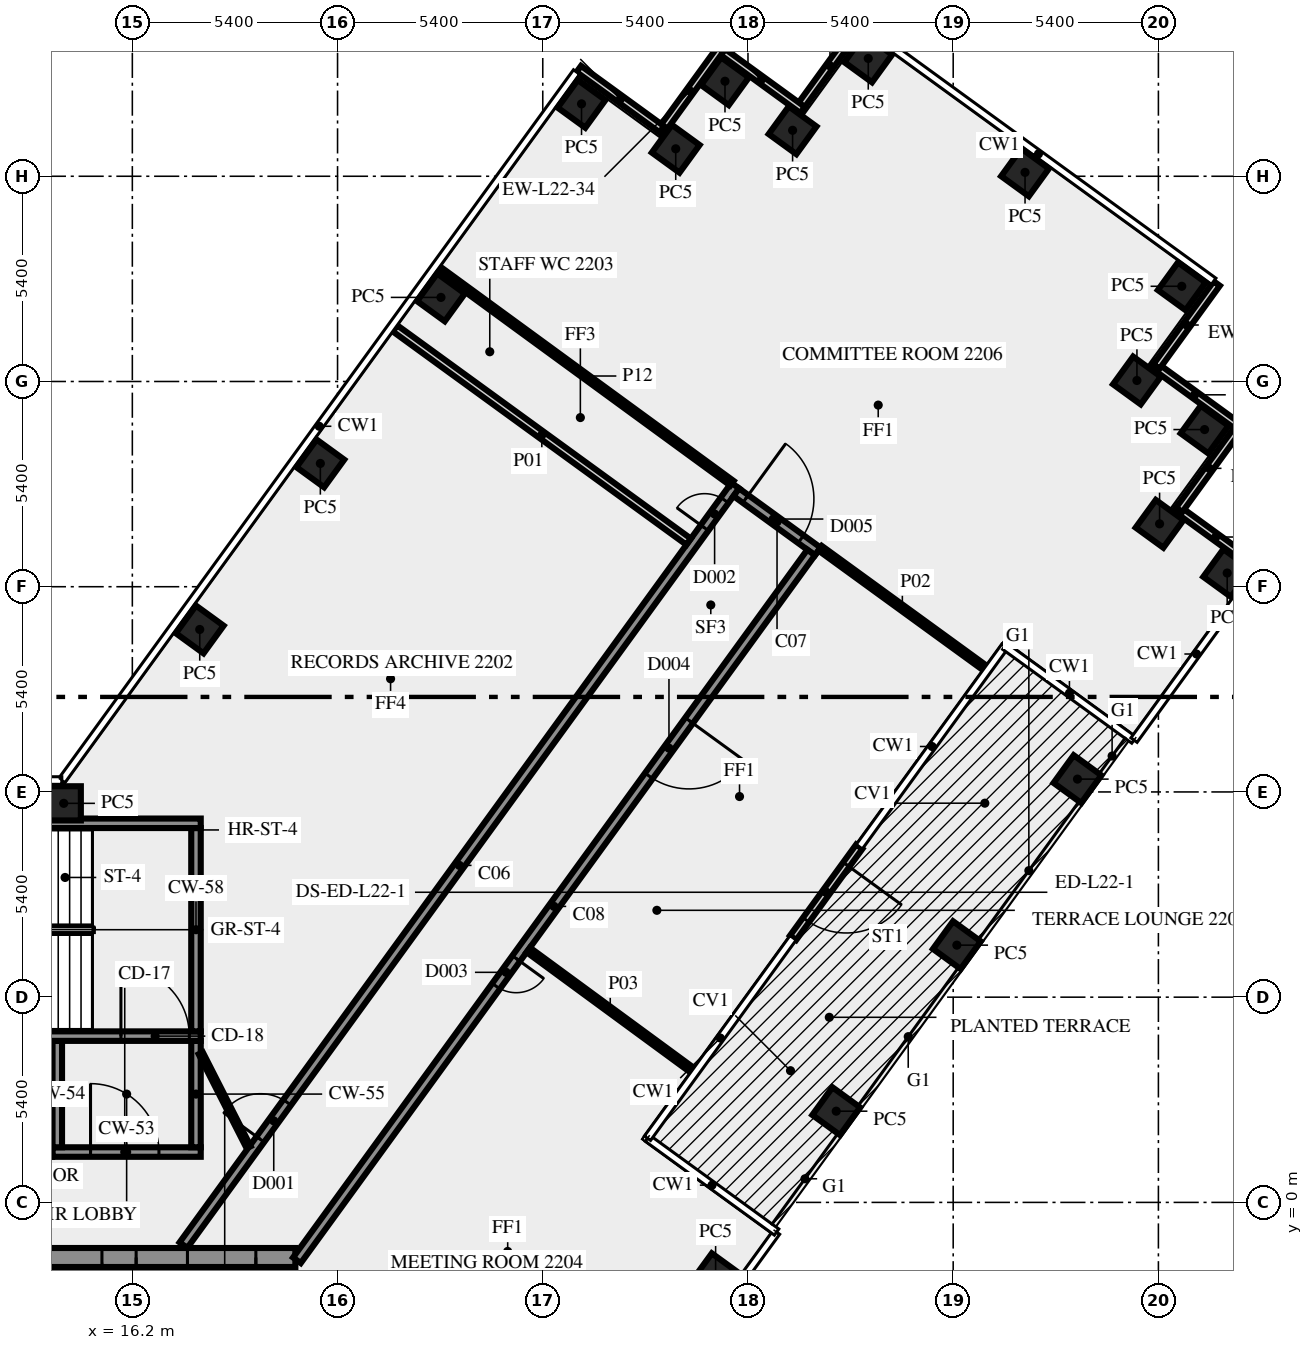
"""IFC4 building model, lengths in metres.
Left out: names, types, materials, properties, quantities, classifications, styles, units other than length and angle.
Written with IfcOpenShell. Run it as: python <this file> out.ifc"""

import sys

from ifc_helpers import new_model, si_unit, direction, frame, frame_2d, origin, origin_2d, place, context, subcontext, project, spatial, rectangle, extrude, element, fill, save


model = new_model("IFC4")
c1 = context("Model", 3, precision=1e-05, world=origin(), true_north=direction((0.0, 1.0)))
c2 = subcontext(c1, "Body", "Model", "MODEL_VIEW")
j1 = project(units=[si_unit("LENGTHUNIT", "METRE"), si_unit("PLANEANGLEUNIT", "RADIAN")], contexts=[c1])
p1 = place(None, origin())
s1 = spatial("IfcSite", under=j1, at=p1, CompositionType="ELEMENT")
p2 = place(p1, origin())
s2 = spatial("IfcBuilding", under=s1, at=p2, CompositionType="ELEMENT")
p3 = place(p2, frame((0.0, 0.0, 97.0)))
s3 = spatial("IfcBuildingStorey", under=s2, at=p3, CompositionType="ELEMENT", Elevation=97.0)
for number, where, z_axis, x_axis in (
    (1, (31.548, -1.969, 0.0), (0.0, 0.0, 1.0), (0.588, 0.809, 0.0)),
    (2, (34.722, 2.4, 0.0), (0.0, 0.0, 1.0), (0.588, 0.809, 0.0)),
    (3, (37.896, 6.769, 0.0), (0.0, 0.0, 1.0), (0.588, 0.809, 0.0)),
    (4, (41.07, 11.137, 0.0), (0.0, 0.0, 1.0), (0.588, 0.809, 0.0)),
    (5, (45.01, 16.56, 0.0), (0.0, 0.0, 1.0), (0.588, 0.809, 0.0)),
    (6, (43.231, 17.854, 0.0), (0.0, 0.0, 1.0), (0.588, 0.809, 0.0)),
    (7, (44.415, 20.335, 0.0), (0.0, 0.0, 1.0), (0.588, 0.809, 0.0)),
    (8, (42.635, 21.626, 0.0), (0.0, 0.0, 1.0), (-0.809, 0.588, 0.0)),
    (9, (43.815, 24.105, 0.0), (0.0, 0.0, 1.0), (-0.809, 0.588, 0.0)),
    (10, (39.691, 27.102, 0.0), (0.0, 0.0, 1.0), (-0.809, 0.588, 0.0)),
    (11, (35.565, 30.1, 0.0), (0.0, 0.0, 1.0), (-0.588, -0.809, 0.0)),
    (12, (33.574, 28.209, 0.0), (0.0, 0.0, 1.0), (-0.809, 0.588, 0.0)),
    (13, (31.795, 29.5, 0.0), (0.0, 0.0, 1.0), (-0.588, -0.809, 0.0)),
    (14, (30.499, 27.723, 0.0), (0.0, 0.0, 1.0), (-0.809, 0.588, 0.0)),
    (15, (28.02, 28.905, 0.0), (0.0, 0.0, 1.0), (-0.809, 0.588, 0.0)),
    (16, (24.321, 23.812, 0.0), (0.0, 0.0, 1.0), (-0.588, -0.809, 0.0)),
    (17, (21.147, 19.444, 0.0), (0.0, 0.0, 1.0), (-0.588, -0.809, 0.0)),
    (18, (17.974, 15.075, 0.0), (0.0, 0.0, 1.0), (-0.588, -0.809, 0.0)),
    (19, (14.395, 10.5, 0.0), (0.0, 0.0, 1.0), (-1.0, 0.0, 0.0)),
):
    element("IfcColumn", number, at=place(p3, frame(where, z_axis=z_axis, x_axis=x_axis)), inside=s3, PredefinedType="COLUMN", context=c2, shape_type="SweptSolid", body=[
        extrude(rectangle(XDim=0.9, YDim=0.9, at=origin_2d()), origin(), (0.0, 0.0, 1.0), 3.65),
    ])
p4 = place(p3, frame((35.328, 9.359, 0.0), z_axis=(0.0, 0.0, 1.0), x_axis=(-0.587774760134, -0.809024617271, 0.0)))
e20 = element("IfcWall", 20, at=p4, inside=s3, PredefinedType="SOLIDWALL", context=c2, shape_type="SweptSolid", body=[
    extrude(rectangle(XDim=2.963, YDim=0.2, at=frame_2d((1.481, 0.0))), origin(), (0.0, 0.0, 1.0), 3.65),
])
p5 = place(p4, frame((0.582, 0.0, 0.0)))
e21 = element("IfcOpeningElement", 21, at=p5, cuts=e20, PredefinedType="OPENING", context=c2, shape_type="SweptSolid", body=[
    extrude(rectangle(XDim=1.8, YDim=2.4, at=frame_2d((0.9, 1.2))), frame((0.0, 0.11, 0.0), z_axis=(0.0, -1.0, 0.0), x_axis=(1.0, 0.0, 0.0)), (0.0, 0.0, 1.0), 0.22),
])
p6 = place(p3, frame((45.761, 16.743, 0.0), z_axis=(0.0, 0.0, 1.0), x_axis=(-0.808979656733, 0.587836639716, 0.0)))
e22 = element("IfcWall", 22, at=p6, inside=s3, PredefinedType="SOLIDWALL", context=c2, shape_type="SweptSolid", body=[
    extrude(rectangle(XDim=2.6, YDim=0.2, at=frame_2d((1.3, 0.0))), origin(), (0.0, 0.0, 1.0), 3.65),
])
for number, where, z_axis, x_axis in (
    (23, (43.746, 18.223, 0.0), (0.0, 0.0, 1.0), (0.588, 0.809, 0.0)),
    (24, (45.245, 20.456, 0.0), (0.0, 0.0, 1.0), (-0.809, 0.588, 0.0)),
    (25, (43.149, 21.994, 0.0), (0.0, 0.0, 1.0), (0.588, 0.809, 0.0)),
    (26, (35.351, 30.997, 0.0), (0.0, 0.0, 1.0), (-0.588, -0.809, 0.0)),
    (27, (33.838, 28.744, 0.0), (0.0, 0.0, 1.0), (-0.809, 0.588, 0.0)),
    (28, (31.67, 30.333, 0.0), (0.0, 0.0, 1.0), (-0.588, -0.809, 0.0)),
    (29, (30.133, 28.237, 0.0), (0.0, 0.0, 1.0), (-0.809, 0.588, 0.0)),
):
    element("IfcWall", number, at=place(p3, frame(where, z_axis=z_axis, x_axis=x_axis)), inside=s3, PredefinedType="SOLIDWALL", context=c2, shape_type="SweptSolid", body=[
        extrude(rectangle(XDim=2.7, YDim=0.2, at=frame_2d((1.35, 0.0))), origin(), (0.0, 0.0, 1.0), 3.65),
    ])
p7 = place(p3, frame((19.75, -10.5, 0.0), z_axis=(0.0, 0.0, 1.0), x_axis=(0.0, 1.0, 0.0)))
e30 = element("IfcWall", 30, at=p7, inside=s3, PredefinedType="SHEAR", context=c2, shape_type="SweptSolid", body=[
    extrude(rectangle(XDim=8.8, YDim=0.5, at=frame_2d((4.4, 0.0))), origin(), (0.0, 0.0, 1.0), 3.65),
])
p8 = place(p3, frame((17.475, -6.0, 0.0), z_axis=(0.0, 0.0, 1.0), x_axis=(0.0, 1.0, 0.0)))
e31 = element("IfcWall", 31, at=p8, inside=s3, PredefinedType="SHEAR", context=c2, shape_type="SweptSolid", body=[
    extrude(rectangle(XDim=4.3, YDim=0.25, at=frame_2d((2.15, 0.0))), origin(), (0.0, 0.0, 1.0), 3.65),
])
p9 = place(p8, frame((0.55, 0.0, 0.0)))
e32 = element("IfcOpeningElement", 32, at=p9, cuts=e31, PredefinedType="OPENING", context=c2, shape_type="SweptSolid", body=[
    extrude(rectangle(XDim=1.3, YDim=2.1, at=frame_2d((0.65, 1.05))), frame((0.0, 0.135, 0.0), z_axis=(0.0, -1.0, 0.0), x_axis=(1.0, 0.0, 0.0)), (0.0, 0.0, 1.0), 0.27),
])
p10 = place(p3, frame((14.225, -3.35, 0.0), z_axis=(0.0, 0.0, 1.0), x_axis=(0.0, 1.0, 0.0)))
e33 = element("IfcWall", 33, at=p10, inside=s3, PredefinedType="SHEAR", context=c2, shape_type="SweptSolid", body=[
    extrude(rectangle(XDim=1.65, YDim=0.25, at=frame_2d((0.825, 0.0))), origin(), (0.0, 0.0, 1.0), 3.65),
])
p11 = place(p3, frame((20.49, -1.45, 0.0), z_axis=(0.0, 0.0, 1.0), x_axis=(-1.0, 0.0, 0.0)))
e34 = element("IfcWall", 34, at=p11, inside=s3, PredefinedType="SHEAR", context=c2, shape_type="SweptSolid", body=[
    extrude(rectangle(XDim=40.98, YDim=0.5, at=frame_2d((20.49, 0.0))), origin(), (0.0, 0.0, 1.0), 3.65),
])
p12 = place(p11, frame((38.14, 0.0, 0.0)))
e35 = element("IfcOpeningElement", 35, at=p12, cuts=e34, PredefinedType="OPENING", context=c2, shape_type="SweptSolid", body=[
    extrude(rectangle(XDim=1.8, YDim=2.1, at=frame_2d((0.9, 1.05))), frame((0.0, 0.26, 0.0), z_axis=(0.0, -1.0, 0.0), x_axis=(1.0, 0.0, 0.0)), (0.0, 0.0, 1.0), 0.52),
])
p13 = place(p11, frame((36.728, 0.0, 0.0)))
e36 = element("IfcOpeningElement", 36, at=p13, cuts=e34, PredefinedType="OPENING", context=c2, shape_type="SweptSolid", body=[
    extrude(rectangle(XDim=0.8, YDim=2.1, at=frame_2d((0.4, 1.05))), frame((0.0, 0.26, 0.0), z_axis=(0.0, -1.0, 0.0), x_axis=(1.0, 0.0, 0.0)), (0.0, 0.0, 1.0), 0.52),
])
p14 = place(p11, frame((35.153, 0.0, 0.0)))
e37 = element("IfcOpeningElement", 37, at=p14, cuts=e34, PredefinedType="OPENING", context=c2, shape_type="SweptSolid", body=[
    extrude(rectangle(XDim=0.8, YDim=2.1, at=frame_2d((0.4, 1.05))), frame((0.0, 0.26, 0.0), z_axis=(0.0, -1.0, 0.0), x_axis=(1.0, 0.0, 0.0)), (0.0, 0.0, 1.0), 0.52),
])
p15 = place(p11, frame((32.94, 0.0, 0.0)))
e38 = element("IfcOpeningElement", 38, at=p15, cuts=e34, PredefinedType="OPENING", context=c2, shape_type="SweptSolid", body=[
    extrude(rectangle(XDim=0.9, YDim=2.1, at=frame_2d((0.45, 1.05))), frame((0.0, 0.26, 0.0), z_axis=(0.0, -1.0, 0.0), x_axis=(1.0, 0.0, 0.0)), (0.0, 0.0, 1.0), 0.52),
])
p16 = place(p11, frame((19.59, 0.0, 0.0)))
e39 = element("IfcOpeningElement", 39, at=p16, cuts=e34, PredefinedType="OPENING", context=c2, shape_type="SweptSolid", body=[
    extrude(rectangle(XDim=2.0, YDim=2.1, at=frame_2d((1.0, 1.05))), frame((0.0, 0.26, 0.0), z_axis=(0.0, -1.0, 0.0), x_axis=(1.0, 0.0, 0.0)), (0.0, 0.0, 1.0), 0.52),
])
p17 = place(p11, frame((7.14, 0.0, 0.0)))
e40 = element("IfcOpeningElement", 40, at=p17, cuts=e34, PredefinedType="OPENING", context=c2, shape_type="SweptSolid", body=[
    extrude(rectangle(XDim=0.9, YDim=2.1, at=frame_2d((0.45, 1.05))), frame((0.0, 0.26, 0.0), z_axis=(0.0, -1.0, 0.0), x_axis=(1.0, 0.0, 0.0)), (0.0, 0.0, 1.0), 0.52),
])
p18 = place(p11, frame((4.19, 0.0, 0.0)))
e41 = element("IfcOpeningElement", 41, at=p18, cuts=e34, PredefinedType="OPENING", context=c2, shape_type="SweptSolid", body=[
    extrude(rectangle(XDim=0.9, YDim=2.1, at=frame_2d((0.45, 1.05))), frame((0.0, 0.26, 0.0), z_axis=(0.0, -1.0, 0.0), x_axis=(1.0, 0.0, 0.0)), (0.0, 0.0, 1.0), 0.52),
])
p19 = place(p11, frame((1.04, 0.0, 0.0)))
e42 = element("IfcOpeningElement", 42, at=p19, cuts=e34, PredefinedType="OPENING", context=c2, shape_type="SweptSolid", body=[
    extrude(rectangle(XDim=1.8, YDim=2.1, at=frame_2d((0.9, 1.05))), frame((0.0, 0.26, 0.0), z_axis=(0.0, -1.0, 0.0), x_axis=(1.0, 0.0, 0.0)), (0.0, 0.0, 1.0), 0.52),
])
p20 = place(p3, frame((14.1, 1.325, 0.0), z_axis=(0.0, 0.0, 1.0), x_axis=(1.0, 0.0, 0.0)))
e43 = element("IfcWall", 43, at=p20, inside=s3, PredefinedType="SHEAR", context=c2, shape_type="SweptSolid", body=[
    extrude(rectangle(XDim=3.9, YDim=0.25, at=frame_2d((1.95, 0.0))), origin(), (0.0, 0.0, 1.0), 3.65),
])
p21 = place(p20, frame((1.0, 0.0, 0.0)))
e44 = element("IfcOpeningElement", 44, at=p21, cuts=e43, PredefinedType="OPENING", context=c2, shape_type="SweptSolid", body=[
    extrude(rectangle(XDim=1.8, YDim=2.1, at=frame_2d((0.9, 1.05))), frame((0.0, 0.135, 0.0), z_axis=(0.0, -1.0, 0.0), x_axis=(1.0, 0.0, 0.0)), (0.0, 0.0, 1.0), 0.27),
])
for number, where, z_axis, x_axis in (
    (45, (14.225, 1.45, 0.0), (0.0, 0.0, 1.0), (0.0, 1.0, 0.0)),
    (46, (17.875, 1.45, 0.0), (0.0, 0.0, 1.0), (0.0, 1.0, 0.0)),
):
    element("IfcWall", number, at=place(p3, frame(where, z_axis=z_axis, x_axis=x_axis)), inside=s3, PredefinedType="SHEAR", context=c2, shape_type="SweptSolid", body=[
        extrude(rectangle(XDim=2.8, YDim=0.25, at=frame_2d((1.4, 0.0))), origin(), (0.0, 0.0, 1.0), 3.65),
    ])
p22 = place(p3, frame((7.5, 4.375, 0.0), z_axis=(0.0, 0.0, 1.0), x_axis=(1.0, 0.0, 0.0)))
e47 = element("IfcWall", 47, at=p22, inside=s3, PredefinedType="SHEAR", context=c2, shape_type="SweptSolid", body=[
    extrude(rectangle(XDim=10.5, YDim=0.25, at=frame_2d((5.25, 0.0))), origin(), (0.0, 0.0, 1.0), 3.65),
])
p23 = place(p22, frame((8.4, 0.0, 0.0)))
e48 = element("IfcOpeningElement", 48, at=p23, cuts=e47, PredefinedType="OPENING", context=c2, shape_type="SweptSolid", body=[
    extrude(rectangle(XDim=1.8, YDim=2.1, at=frame_2d((0.9, 1.05))), frame((0.0, 0.135, 0.0), z_axis=(0.0, -1.0, 0.0), x_axis=(1.0, 0.0, 0.0)), (0.0, 0.0, 1.0), 0.27),
])
p24 = place(p3, frame((17.875, 4.5, 0.0), z_axis=(0.0, 0.0, 1.0), x_axis=(0.0, 1.0, 0.0)))
e49 = element("IfcWall", 49, at=p24, inside=s3, PredefinedType="SHEAR", context=c2, shape_type="SweptSolid", body=[
    extrude(rectangle(XDim=5.35, YDim=0.25, at=frame_2d((2.675, 0.0))), origin(), (0.0, 0.0, 1.0), 3.65),
])
p25 = place(p3, frame((7.5, 9.975, 0.0), z_axis=(0.0, 0.0, 1.0), x_axis=(1.0, 0.0, 0.0)))
e50 = element("IfcWall", 50, at=p25, inside=s3, PredefinedType="SHEAR", context=c2, shape_type="SweptSolid", body=[
    extrude(rectangle(XDim=10.5, YDim=0.25, at=frame_2d((5.25, 0.0))), origin(), (0.0, 0.0, 1.0), 3.65),
])
p26 = place(p25, frame((2.0, 0.0, 1.0)))
e51 = element("IfcOpeningElement", 51, at=p26, cuts=e50, PredefinedType="OPENING", context=c2, shape_type="SweptSolid", body=[
    extrude(rectangle(XDim=1.2, YDim=1.2, at=frame_2d((0.6, 0.6))), frame((0.0, 0.135, 0.0), z_axis=(0.0, -1.0, 0.0), x_axis=(1.0, 0.0, 0.0)), (0.0, 0.0, 1.0), 0.27),
])
p27 = place(p3, frame((17.545, -1.125, 0.0), z_axis=(0.0, 0.0, 1.0), x_axis=(0.587791430994, 0.80901250525, 0.0)))
e52 = element("IfcWall", 52, at=p27, inside=s3, PredefinedType="SOLIDWALL", context=c2, shape_type="SweptSolid", body=[
    extrude(rectangle(XDim=24.703, YDim=0.25, at=frame_2d((12.352, 0.0))), origin(), (0.0, 0.0, 1.0), 3.65),
])
p28 = place(p27, frame((3.442, 0.0, 0.0)))
e53 = element("IfcOpeningElement", 53, at=p28, cuts=e52, PredefinedType="OPENING", context=c2, shape_type="SweptSolid", body=[
    extrude(rectangle(XDim=1.2, YDim=2.1, at=frame_2d((0.6, 1.05))), frame((0.0, 0.135, 0.0), z_axis=(0.0, -1.0, 0.0), x_axis=(1.0, 0.0, 0.0)), (0.0, 0.0, 1.0), 0.27),
])
p29 = place(p27, frame((23.329, 0.0, 0.0)))
e54 = element("IfcOpeningElement", 54, at=p29, cuts=e52, PredefinedType="OPENING", context=c2, shape_type="SweptSolid", body=[
    extrude(rectangle(XDim=0.9, YDim=2.1, at=frame_2d((0.45, 1.05))), frame((0.0, 0.135, 0.0), z_axis=(0.0, -1.0, 0.0), x_axis=(1.0, 0.0, 0.0)), (0.0, 0.0, 1.0), 0.27),
])
p30 = place(p3, frame((32.093, 18.686, 0.0), z_axis=(0.0, 0.0, 1.0), x_axis=(0.809006914995, -0.587799125119, 0.0)))
e55 = element("IfcWall", 55, at=p30, inside=s3, PredefinedType="SOLIDWALL", context=c2, shape_type="SweptSolid", body=[
    extrude(rectangle(XDim=2.65, YDim=0.25, at=frame_2d((1.325, 0.0))), origin(), (0.0, 0.0, 1.0), 3.65),
])
p31 = place(p30, frame((0.3, 0.0, 0.0)))
e56 = element("IfcOpeningElement", 56, at=p31, cuts=e55, PredefinedType="OPENING", context=c2, shape_type="SweptSolid", body=[
    extrude(rectangle(XDim=1.8, YDim=2.1, at=frame_2d((0.9, 1.05))), frame((0.0, 0.135, 0.0), z_axis=(0.0, -1.0, 0.0), x_axis=(1.0, 0.0, 0.0)), (0.0, 0.0, 1.0), 0.27),
])
p32 = place(p3, frame((34.062, 17.101, 0.0), z_axis=(0.0, 0.0, 1.0), x_axis=(-0.58778129431, -0.809019870003, 0.0)))
e57 = element("IfcWall", 57, at=p32, inside=s3, PredefinedType="SOLIDWALL", context=c2, shape_type="SweptSolid", body=[
    extrude(rectangle(XDim=23.021, YDim=0.25, at=frame_2d((11.51, 0.0))), origin(), (0.0, 0.0, 1.0), 3.65),
])
p33 = place(p32, frame((5.465, 0.0, 0.0)))
e58 = element("IfcOpeningElement", 58, at=p33, cuts=e57, PredefinedType="OPENING", context=c2, shape_type="SweptSolid", body=[
    extrude(rectangle(XDim=1.8, YDim=2.1, at=frame_2d((0.9, 1.05))), frame((0.0, 0.135, 0.0), z_axis=(0.0, -1.0, 0.0), x_axis=(1.0, 0.0, 0.0)), (0.0, 0.0, 1.0), 0.27),
])
p34 = place(p32, frame((13.205, 0.0, 0.0)))
e59 = element("IfcOpeningElement", 59, at=p34, cuts=e57, PredefinedType="OPENING", context=c2, shape_type="SweptSolid", body=[
    extrude(rectangle(XDim=0.9, YDim=2.1, at=frame_2d((0.45, 1.05))), frame((0.0, 0.135, 0.0), z_axis=(0.0, -1.0, 0.0), x_axis=(1.0, 0.0, 0.0)), (0.0, 0.0, 1.0), 0.27),
])
p35 = place(p3, frame((30.838, 17.385, 0.0), z_axis=(0.0, 0.0, 1.0), x_axis=(-0.809043311713, 0.587749027879, 0.0)))
e60 = element("IfcWall", 60, at=p35, inside=s3, PredefinedType="SOLIDWALL", context=c2, shape_type="SweptSolid", body=[
    extrude(rectangle(XDim=9.55, YDim=0.2, at=frame_2d((4.775, 0.0))), origin(), (0.0, 0.0, 1.0), 2.75),
])
p36 = place(p3, frame((38.626, 14.068, 0.0), z_axis=(0.0, 0.0, 1.0), x_axis=(-0.808982692221, 0.587832462261, 0.0)))
e61 = element("IfcWall", 61, at=p36, inside=s3, PredefinedType="PARTITIONING", context=c2, shape_type="SweptSolid", body=[
    extrude(rectangle(XDim=5.35, YDim=0.15, at=frame_2d((2.675, 0.0))), origin(), (0.0, 0.0, 1.0), 3.65),
])
p37 = place(p3, frame((26.619, 6.643, 0.0), z_axis=(0.0, 0.0, 1.0), x_axis=(0.806280213972, -0.591533783107, 0.0)))
e62 = element("IfcWall", 62, at=p37, inside=s3, PredefinedType="PARTITIONING", context=c2, shape_type="SweptSolid", body=[
    extrude(rectangle(XDim=5.35, YDim=0.15, at=frame_2d((2.675, 0.0))), origin(), (0.0, 0.0, 1.0), 3.65),
])
p38 = place(p3, frame((24.251, 24.566, 0.0), z_axis=(0.0, 0.0, 1.0), x_axis=(0.807588329082, -0.589746632657, 0.0)))
e63 = element("IfcWall", 63, at=p38, inside=s3, PredefinedType="PARTITIONING", context=c2, shape_type="SweptSolid", body=[
    extrude(rectangle(XDim=9.57, YDim=0.15, at=frame_2d((4.785, 0.0))), origin(), (0.0, 0.0, 1.0), 2.75),
])
p39 = place(p3, frame((18.0, 3.925, 0.0), z_axis=(0.0, 0.0, 1.0), x_axis=(0.453950796792, -0.891026752736, 0.0)))
e64 = element("IfcWall", 64, at=p39, inside=s3, PredefinedType="PARTITIONING", context=c2, shape_type="SweptSolid", body=[
    extrude(rectangle(XDim=2.778, YDim=0.12, at=frame_2d((1.389, 0.0))), origin(), (0.0, 0.0, 1.0), 3.65),
])
p40 = place(p5, origin())
e65 = element("IfcDoor", 65, at=p40, inside=s3, OperationType="DOUBLE_DOOR_SINGLE_SWING", PredefinedType="DOOR", context=c2, shape_type="SweptSolid", body=[
    extrude(rectangle(XDim=1.8, YDim=2.4, at=frame_2d((0.9, 1.2))), frame((0.0, 0.025, 0.0), z_axis=(0.0, -1.0, 0.0), x_axis=(1.0, 0.0, 0.0)), (0.0, 0.0, 1.0), 0.05),
])
fill(e21, e65)
p41 = place(p18, origin())
e66 = element("IfcDoor", 66, at=p41, inside=s3, OperationType="SINGLE_SWING_LEFT", PredefinedType="DOOR", context=c2, shape_type="SweptSolid", body=[
    extrude(rectangle(XDim=0.9, YDim=2.1, at=frame_2d((0.45, 1.05))), frame((0.0, 0.025, 0.0), z_axis=(0.0, -1.0, 0.0), x_axis=(1.0, 0.0, 0.0)), (0.0, 0.0, 1.0), 0.05),
])
fill(e41, e66)
p42 = place(p19, origin())
e67 = element("IfcDoor", 67, at=p42, inside=s3, OperationType="DOUBLE_DOOR_SINGLE_SWING", PredefinedType="DOOR", context=c2, shape_type="SweptSolid", body=[
    extrude(rectangle(XDim=1.8, YDim=2.1, at=frame_2d((0.9, 1.05))), frame((0.0, 0.025, 0.0), z_axis=(0.0, -1.0, 0.0), x_axis=(1.0, 0.0, 0.0)), (0.0, 0.0, 1.0), 0.05),
])
fill(e42, e67)
p43 = place(p21, origin())
e68 = element("IfcDoor", 68, at=p43, inside=s3, OperationType="DOUBLE_DOOR_SINGLE_SWING", PredefinedType="DOOR", context=c2, shape_type="SweptSolid", body=[
    extrude(rectangle(XDim=1.8, YDim=2.1, at=frame_2d((0.9, 1.05))), frame((0.0, 0.025, 0.0), z_axis=(0.0, -1.0, 0.0), x_axis=(1.0, 0.0, 0.0)), (0.0, 0.0, 1.0), 0.05),
])
fill(e44, e68)
p44 = place(p23, origin())
e69 = element("IfcDoor", 69, at=p44, inside=s3, OperationType="DOUBLE_DOOR_SINGLE_SWING", PredefinedType="DOOR", context=c2, shape_type="SweptSolid", body=[
    extrude(rectangle(XDim=1.8, YDim=2.1, at=frame_2d((0.9, 1.05))), frame((0.0, 0.025, 0.0), z_axis=(0.0, -1.0, 0.0), x_axis=(1.0, 0.0, 0.0)), (0.0, 0.0, 1.0), 0.05),
])
fill(e48, e69)
p45 = place(p28, origin())
e70 = element("IfcDoor", 70, at=p45, inside=s3, OperationType="SINGLE_SWING_LEFT", PredefinedType="DOOR", context=c2, shape_type="SweptSolid", body=[
    extrude(rectangle(XDim=1.2, YDim=2.1, at=frame_2d((0.6, 1.05))), frame((0.0, 0.025, 0.0), z_axis=(0.0, -1.0, 0.0), x_axis=(1.0, 0.0, 0.0)), (0.0, 0.0, 1.0), 0.05),
])
fill(e53, e70)
p46 = place(p33, origin())
e71 = element("IfcDoor", 71, at=p46, inside=s3, OperationType="DOUBLE_DOOR_SINGLE_SWING", PredefinedType="DOOR", context=c2, shape_type="SweptSolid", body=[
    extrude(rectangle(XDim=1.8, YDim=2.1, at=frame_2d((0.9, 1.05))), frame((0.0, 0.025, 0.0), z_axis=(0.0, -1.0, 0.0), x_axis=(1.0, 0.0, 0.0)), (0.0, 0.0, 1.0), 0.05),
])
fill(e58, e71)
p47 = place(p31, origin())
e72 = element("IfcDoor", 72, at=p47, inside=s3, OperationType="DOUBLE_DOOR_SINGLE_SWING", PredefinedType="DOOR", context=c2, shape_type="SweptSolid", body=[
    extrude(rectangle(XDim=1.8, YDim=2.1, at=frame_2d((0.9, 1.05))), frame((0.0, 0.025, 0.0), z_axis=(0.0, -1.0, 0.0), x_axis=(1.0, 0.0, 0.0)), (0.0, 0.0, 1.0), 0.05),
])
fill(e56, e72)
p48 = place(p34, origin())
e73 = element("IfcDoor", 73, at=p48, inside=s3, OperationType="SINGLE_SWING_LEFT", PredefinedType="DOOR", context=c2, shape_type="SweptSolid", body=[
    extrude(rectangle(XDim=0.9, YDim=2.1, at=frame_2d((0.45, 1.05))), frame((0.0, 0.025, 0.0), z_axis=(0.0, -1.0, 0.0), x_axis=(1.0, 0.0, 0.0)), (0.0, 0.0, 1.0), 0.05),
])
fill(e59, e73)
p49 = place(p29, origin())
e74 = element("IfcDoor", 74, at=p49, inside=s3, OperationType="SINGLE_SWING_RIGHT", PredefinedType="DOOR", context=c2, shape_type="SweptSolid", body=[
    extrude(rectangle(XDim=0.9, YDim=2.1, at=frame_2d((0.45, 1.05))), frame((0.0, 0.025, 0.0), z_axis=(0.0, -1.0, 0.0), x_axis=(1.0, 0.0, 0.0)), (0.0, 0.0, 1.0), 0.05),
])
fill(e54, e74)
save(model, sys.argv[1])
